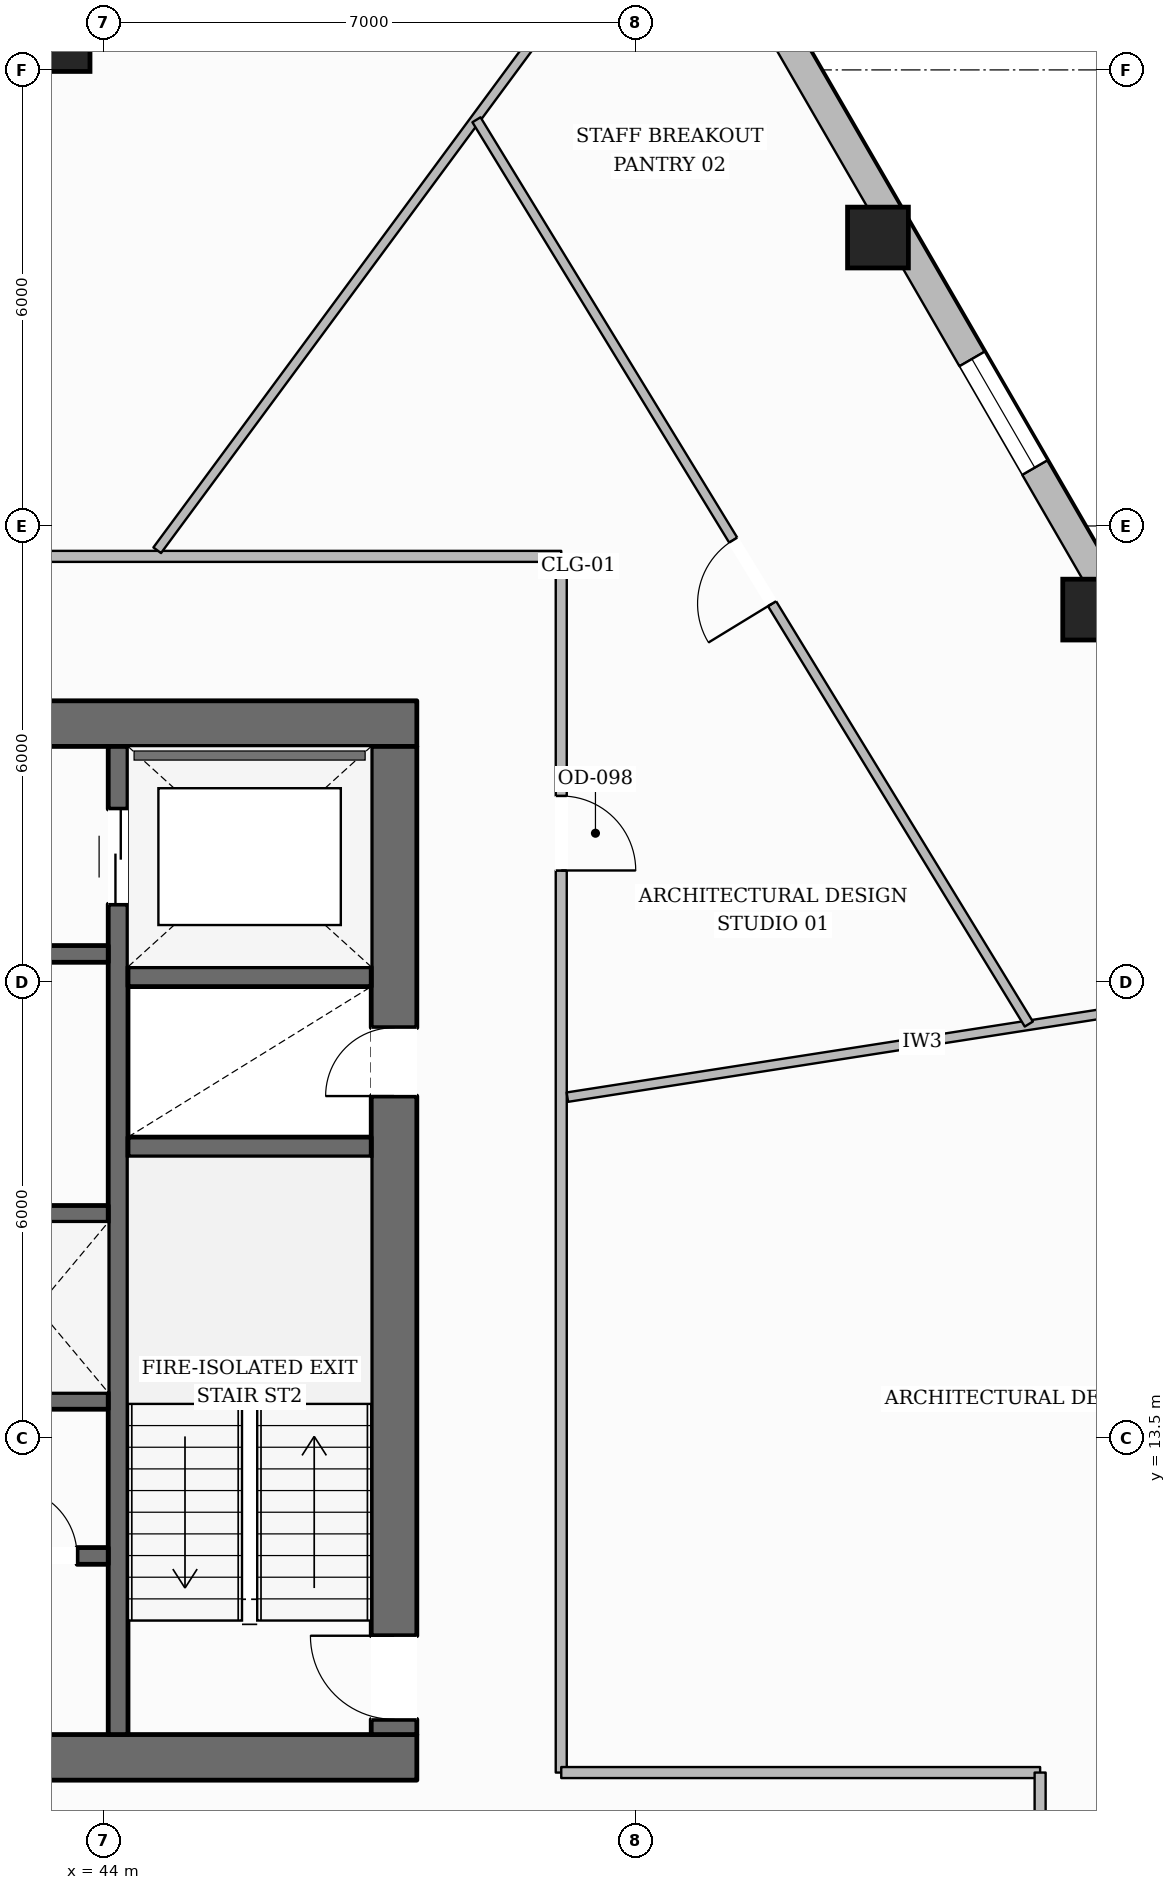
"""IFC4 building model, lengths in metres.
Left out: names, types, materials, properties, quantities, classifications, styles, units other than length and angle.
Written with IfcOpenShell. Run it as: python <this file> out.ifc"""

import sys

from ifc_helpers import new_model, si_unit, direction, frame, frame_2d, origin, origin_2d, place, context, subcontext, project, spatial, rectangle, hollow_rectangle, extrude, element, fill, save


model = new_model("IFC4")
c1 = context("Model", 3, precision=1e-05, world=origin(), true_north=direction((0.0, 1.0)))
c2 = subcontext(c1, "Body", "Model", "MODEL_VIEW")
j1 = project(units=[si_unit("LENGTHUNIT", "METRE"), si_unit("PLANEANGLEUNIT", "RADIAN")], contexts=[c1])
p1 = place(None, origin())
s1 = spatial("IfcSite", under=j1, at=p1, CompositionType="ELEMENT")
p2 = place(p1, origin())
s2 = spatial("IfcBuilding", under=s1, at=p2, CompositionType="ELEMENT")
p3 = place(p2, frame((0.0, 0.0, 40.65)))
s3 = spatial("IfcBuildingStorey", under=s2, at=p3, CompositionType="ELEMENT", Elevation=40.65)
p4 = place(p3, frame((27.88, 9.3, 0.0), z_axis=(0.0, 0.0, 1.0), x_axis=(1.0, 0.0, 0.0)))
e1 = element("IfcWall", 1, at=p4, inside=s3, PredefinedType="SOLIDWALL", context=c2, shape_type="SweptSolid", body=[
    extrude(rectangle(XDim=20.24, YDim=0.6, at=frame_2d((10.12, 0.0))), origin(), (0.0, 0.0, 1.0), 3.59),
])
p5 = place(p4, frame((10.62, 0.0, 0.0)))
e2 = element("IfcOpeningElement", 2, at=p5, cuts=e1, PredefinedType="OPENING", context=c2, shape_type="SweptSolid", body=[
    extrude(rectangle(XDim=1.4, YDim=2.2, at=frame_2d((0.7, 1.1))), frame((0.0, 0.31, 0.0), z_axis=(0.0, -1.0, 0.0), x_axis=(1.0, 0.0, 0.0)), (0.0, 0.0, 1.0), 0.62),
])
p6 = place(p3, frame((27.88, 22.9, 0.0), z_axis=(0.0, 0.0, 1.0), x_axis=(1.0, 0.0, 0.0)))
e3 = element("IfcWall", 3, at=p6, inside=s3, PredefinedType="SOLIDWALL", context=c2, shape_type="SweptSolid", body=[
    extrude(rectangle(XDim=20.24, YDim=0.6, at=frame_2d((10.12, 0.0))), origin(), (0.0, 0.0, 1.0), 3.59),
])
p7 = place(p6, frame((6.395, 0.0, 0.0)))
e4 = element("IfcOpeningElement", 4, at=p7, cuts=e3, PredefinedType="OPENING", context=c2, shape_type="SweptSolid", body=[
    extrude(rectangle(XDim=1.05, YDim=2.15, at=frame_2d((0.525, 1.075))), frame((0.0, 0.31, 0.0), z_axis=(0.0, -1.0, 0.0), x_axis=(1.0, 0.0, 0.0)), (0.0, 0.0, 1.0), 0.62),
])
p8 = place(p6, frame((12.795, 0.0, 0.0)))
e5 = element("IfcOpeningElement", 5, at=p8, cuts=e3, PredefinedType="OPENING", context=c2, shape_type="SweptSolid", body=[
    extrude(rectangle(XDim=1.05, YDim=2.15, at=frame_2d((0.525, 1.075))), frame((0.0, 0.31, 0.0), z_axis=(0.0, -1.0, 0.0), x_axis=(1.0, 0.0, 0.0)), (0.0, 0.0, 1.0), 0.62),
])
p9 = place(p3, frame((47.82, 9.6, 0.0), z_axis=(0.0, 0.0, 1.0), x_axis=(0.0, 1.0, 0.0)))
e6 = element("IfcWall", 6, at=p9, inside=s3, PredefinedType="SOLIDWALL", context=c2, shape_type="SweptSolid", body=[
    extrude(rectangle(XDim=13.0, YDim=0.6, at=frame_2d((6.5, 0.0))), origin(), (0.0, 0.0, 1.0), 3.59),
])
p10 = place(p9, frame((0.2, 0.0, 0.0)))
e7 = element("IfcOpeningElement", 7, at=p10, cuts=e6, PredefinedType="OPENING", context=c2, shape_type="SweptSolid", body=[
    extrude(rectangle(XDim=1.1, YDim=2.15, at=frame_2d((0.55, 1.075))), frame((0.0, 0.31, 0.0), z_axis=(0.0, -1.0, 0.0), x_axis=(1.0, 0.0, 0.0)), (0.0, 0.0, 1.0), 0.62),
])
p11 = place(p9, frame((8.4, 0.0, 0.0)))
e8 = element("IfcOpeningElement", 8, at=p11, cuts=e6, PredefinedType="OPENING", context=c2, shape_type="SweptSolid", body=[
    extrude(rectangle(XDim=0.9, YDim=2.1, at=frame_2d((0.45, 1.05))), frame((0.0, 0.31, 0.0), z_axis=(0.0, -1.0, 0.0), x_axis=(1.0, 0.0, 0.0)), (0.0, 0.0, 1.0), 0.62),
])
p12 = place(p3, frame((44.19, 9.6, 0.0), z_axis=(0.0, 0.0, 1.0), x_axis=(0.0, 1.0, 0.0)))
e9 = element("IfcWall", 9, at=p12, inside=s3, PredefinedType="SHEAR", context=c2, shape_type="SweptSolid", body=[
    extrude(rectangle(XDim=13.0, YDim=0.26, at=frame_2d((6.5, 0.0))), origin(), (0.0, 0.0, 1.0), 3.59),
])
p13 = place(p12, frame((10.925, 0.0, 0.0)))
e10 = element("IfcOpeningElement", 10, at=p13, cuts=e9, PredefinedType="OPENING", context=c2, shape_type="SweptSolid", body=[
    extrude(rectangle(XDim=1.25, YDim=2.25, at=frame_2d((0.625, 1.125))), frame((0.0, 0.14, 0.0), z_axis=(0.0, -1.0, 0.0), x_axis=(1.0, 0.0, 0.0)), (0.0, 0.0, 1.0), 0.28),
])
for number, where, z_axis, x_axis in (
    (11, (44.32, 17.33, 0.0), (0.0, 0.0, 1.0), (1.0, 0.0, 0.0)),
    (12, (44.32, 19.57, 0.0), (0.0, 0.0, 1.0), (1.0, 0.0, 0.0)),
):
    element("IfcWall", number, at=place(p3, frame(where, z_axis=z_axis, x_axis=x_axis)), inside=s3, PredefinedType="SHEAR", context=c2, shape_type="SweptSolid", body=[
        extrude(rectangle(XDim=3.2, YDim=0.26, at=frame_2d((1.6, 0.0))), origin(), (0.0, 0.0, 1.0), 3.59),
    ])
p14 = place(p3, frame((31.94, 19.87, 0.0), z_axis=(0.0, 0.0, 1.0), x_axis=(1.0, 0.0, 0.0)))
e13 = element("IfcWall", 13, at=p14, inside=s3, PredefinedType="SOLIDWALL", context=c2, shape_type="SweptSolid", body=[
    extrude(rectangle(XDim=12.12, YDim=0.22, at=frame_2d((6.06, 0.0))), origin(), (0.0, 0.0, 1.0), 3.59),
])
p15 = place(p14, frame((6.3, 0.0, 0.0)))
e14 = element("IfcOpeningElement", 14, at=p15, cuts=e13, PredefinedType="OPENING", context=c2, shape_type="SweptSolid", body=[
    extrude(rectangle(XDim=1.1, YDim=2.15, at=frame_2d((0.55, 1.075))), frame((0.0, 0.12, 0.0), z_axis=(0.0, -1.0, 0.0), x_axis=(1.0, 0.0, 0.0)), (0.0, 0.0, 1.0), 0.24),
])
p16 = place(p14, frame((9.51, 0.0, 0.0)))
e15 = element("IfcOpeningElement", 15, at=p16, cuts=e13, PredefinedType="OPENING", context=c2, shape_type="SweptSolid", body=[
    extrude(rectangle(XDim=0.9, YDim=2.1, at=frame_2d((0.45, 1.05))), frame((0.0, 0.12, 0.0), z_axis=(0.0, -1.0, 0.0), x_axis=(1.0, 0.0, 0.0)), (0.0, 0.0, 1.0), 0.24),
])
p17 = place(p3, frame((31.94, 16.45, 0.0), z_axis=(0.0, 0.0, 1.0), x_axis=(1.0, 0.0, 0.0)))
e16 = element("IfcWall", 16, at=p17, inside=s3, PredefinedType="SOLIDWALL", context=c2, shape_type="SweptSolid", body=[
    extrude(rectangle(XDim=12.12, YDim=0.22, at=frame_2d((6.06, 0.0))), origin(), (0.0, 0.0, 1.0), 3.59),
])
p18 = place(p3, frame((31.94, 13.99, 0.0), z_axis=(0.0, 0.0, 1.0), x_axis=(1.0, 0.0, 0.0)))
e17 = element("IfcWall", 17, at=p18, inside=s3, PredefinedType="SOLIDWALL", context=c2, shape_type="SweptSolid", body=[
    extrude(rectangle(XDim=12.12, YDim=0.22, at=frame_2d((6.06, 0.0))), origin(), (0.0, 0.0, 1.0), 3.59),
])
p19 = place(p18, frame((0.385, 0.0, 0.0)))
e18 = element("IfcOpeningElement", 18, at=p19, cuts=e17, PredefinedType="OPENING", context=c2, shape_type="SweptSolid", body=[
    extrude(rectangle(XDim=1.1, YDim=2.2, at=frame_2d((0.55, 1.1))), frame((0.0, 0.12, 0.0), z_axis=(0.0, -1.0, 0.0), x_axis=(1.0, 0.0, 0.0)), (0.0, 0.0, 1.0), 0.24),
])
p20 = place(p18, frame((2.435, 0.0, 0.0)))
e19 = element("IfcOpeningElement", 19, at=p20, cuts=e17, PredefinedType="OPENING", context=c2, shape_type="SweptSolid", body=[
    extrude(rectangle(XDim=1.1, YDim=2.2, at=frame_2d((0.55, 1.1))), frame((0.0, 0.12, 0.0), z_axis=(0.0, -1.0, 0.0), x_axis=(1.0, 0.0, 0.0)), (0.0, 0.0, 1.0), 0.24),
])
p21 = place(p18, frame((4.485, 0.0, 0.0)))
e20 = element("IfcOpeningElement", 20, at=p21, cuts=e17, PredefinedType="OPENING", context=c2, shape_type="SweptSolid", body=[
    extrude(rectangle(XDim=1.1, YDim=2.2, at=frame_2d((0.55, 1.1))), frame((0.0, 0.12, 0.0), z_axis=(0.0, -1.0, 0.0), x_axis=(1.0, 0.0, 0.0)), (0.0, 0.0, 1.0), 0.24),
])
p22 = place(p3, frame((40.28, 11.95, 0.0), z_axis=(0.0, 0.0, 1.0), x_axis=(1.0, 0.0, 0.0)))
e21 = element("IfcWall", 21, at=p22, inside=s3, PredefinedType="SOLIDWALL", context=c2, shape_type="SweptSolid", body=[
    extrude(rectangle(XDim=3.78, YDim=0.22, at=frame_2d((1.89, 0.0))), origin(), (0.0, 0.0, 1.0), 3.59),
])
p23 = place(p22, frame((0.62, 0.0, 0.0)))
e22 = element("IfcOpeningElement", 22, at=p23, cuts=e21, PredefinedType="OPENING", context=c2, shape_type="SweptSolid", body=[
    extrude(rectangle(XDim=0.9, YDim=2.1, at=frame_2d((0.45, 1.05))), frame((0.0, 0.12, 0.0), z_axis=(0.0, -1.0, 0.0), x_axis=(1.0, 0.0, 0.0)), (0.0, 0.0, 1.0), 0.24),
])
p24 = place(p22, frame((2.47, 0.0, 0.0)))
e23 = element("IfcOpeningElement", 23, at=p24, cuts=e21, PredefinedType="OPENING", context=c2, shape_type="SweptSolid", body=[
    extrude(rectangle(XDim=0.9, YDim=2.1, at=frame_2d((0.45, 1.05))), frame((0.0, 0.12, 0.0), z_axis=(0.0, -1.0, 0.0), x_axis=(1.0, 0.0, 0.0)), (0.0, 0.0, 1.0), 0.24),
])
for number, where, z_axis, x_axis in (
    (24, (57.018, 24.4, 0.0), (0.0, 0.0, 1.0), (1.0, 0.0, 0.0)),
    (25, (54.187, 29.295, 0.0), (0.0, 0.0, 1.0), (1.0, 0.0, 0.0)),
):
    element("IfcColumn", number, at=place(p3, frame(where, z_axis=z_axis, x_axis=x_axis)), inside=s3, PredefinedType="COLUMN", context=c2, shape_type="SweptSolid", body=[
        extrude(hollow_rectangle(XDim=0.8, YDim=0.8, WallThickness=0.036, at=origin_2d()), origin(), (0.0, 0.0, 1.0), 3.59),
    ])
p25 = place(p3, frame((43.5, 31.8, 0.0), z_axis=(0.0, 0.0, 1.0), x_axis=(1.0, 0.0, 0.0)))
e26 = element("IfcColumn", 26, at=p25, inside=s3, PredefinedType="COLUMN", context=c2, shape_type="SweptSolid", body=[
    extrude(hollow_rectangle(XDim=0.64, YDim=0.64, WallThickness=0.028, at=origin_2d()), origin(), (0.0, 0.0, 1.0), 3.59),
])
p26 = place(p3, frame((63.15, 14.89, 0.0), z_axis=(0.0, 0.0, 1.0), x_axis=(-0.495908066063, -0.868375028437, 0.0)))
e27 = element("IfcWall", 27, at=p26, inside=s3, PredefinedType="STANDARD", context=c2, shape_type="SweptSolid", body=[
    extrude(rectangle(XDim=16.172, YDim=0.3, at=frame_2d((8.086, 0.0))), origin(), (0.0, 0.0, 1.0), 2.97),
])
p27 = place(p26, frame((7.486, 0.0, 0.65)))
e28 = element("IfcOpeningElement", 28, at=p27, cuts=e27, PredefinedType="OPENING", context=c2, shape_type="SweptSolid", body=[
    extrude(rectangle(XDim=1.2, YDim=1.7, at=frame_2d((0.6, 0.85))), frame((0.0, 0.16, 0.0), z_axis=(0.0, -1.0, 0.0), x_axis=(1.0, 0.0, 0.0)), (0.0, 0.0, 1.0), 0.32),
])
p28 = place(p3, frame((45.69, 44.525, 0.0), z_axis=(0.0, 0.0, 1.0), x_axis=(0.500663446356, -0.865642023866, 0.0)))
e29 = element("IfcWall", 29, at=p28, inside=s3, PredefinedType="STANDARD", context=c2, shape_type="SweptSolid", body=[
    extrude(rectangle(XDim=34.878, YDim=0.38, at=frame_2d((17.439, 0.0))), origin(), (0.0, 0.0, 1.0), 2.97),
])
p29 = place(p28, frame((8.319, 0.0, 0.0)))
e30 = element("IfcOpeningElement", 30, at=p29, cuts=e29, PredefinedType="OPENING", context=c2, shape_type="SweptSolid", body=[
    extrude(rectangle(XDim=1.0, YDim=2.2, at=frame_2d((0.5, 1.1))), frame((0.0, 0.2, 0.0), z_axis=(0.0, -1.0, 0.0), x_axis=(1.0, 0.0, 0.0)), (0.0, 0.0, 1.0), 0.4),
])
p30 = place(p28, frame((30.75, 0.0, 0.65)))
e31 = element("IfcOpeningElement", 31, at=p30, cuts=e29, PredefinedType="OPENING", context=c2, shape_type="SweptSolid", body=[
    extrude(rectangle(XDim=1.65, YDim=1.75, at=frame_2d((0.825, 0.875))), frame((0.0, 0.2, 0.0), z_axis=(0.0, -1.0, 0.0), x_axis=(1.0, 0.0, 0.0)), (0.0, 0.0, 1.0), 0.4),
])
p31 = place(p28, frame((25.095, 0.0, 0.65)))
e32 = element("IfcOpeningElement", 32, at=p31, cuts=e29, PredefinedType="OPENING", context=c2, shape_type="SweptSolid", body=[
    extrude(rectangle(XDim=1.65, YDim=1.75, at=frame_2d((0.825, 0.875))), frame((0.0, 0.2, 0.0), z_axis=(0.0, -1.0, 0.0), x_axis=(1.0, 0.0, 0.0)), (0.0, 0.0, 1.0), 0.4),
])
p32 = place(p28, frame((19.441, 0.0, 0.65)))
e33 = element("IfcOpeningElement", 33, at=p32, cuts=e29, PredefinedType="OPENING", context=c2, shape_type="SweptSolid", body=[
    extrude(rectangle(XDim=1.65, YDim=1.75, at=frame_2d((0.825, 0.875))), frame((0.0, 0.2, 0.0), z_axis=(0.0, -1.0, 0.0), x_axis=(1.0, 0.0, 0.0)), (0.0, 0.0, 1.0), 0.4),
])
p33 = place(p28, frame((2.477, 0.0, 0.65)))
e34 = element("IfcOpeningElement", 34, at=p33, cuts=e29, PredefinedType="OPENING", context=c2, shape_type="SweptSolid", body=[
    extrude(rectangle(XDim=1.65, YDim=1.75, at=frame_2d((0.825, 0.875))), frame((0.0, 0.2, 0.0), z_axis=(0.0, -1.0, 0.0), x_axis=(1.0, 0.0, 0.0)), (0.0, 0.0, 1.0), 0.4),
])
p34 = place(p3, frame((39.0, 25.1, 0.0), z_axis=(0.0, 0.0, 1.0), x_axis=(1.0, 0.0, 0.0)))
e35 = element("IfcWall", 35, at=p34, inside=s3, PredefinedType="PARTITIONING", context=c2, shape_type="SweptSolid", body=[
    extrude(rectangle(XDim=11.02, YDim=0.145, at=frame_2d((5.51, 0.0))), origin(), (0.0, 0.0, 1.0), 3.59),
])
p35 = place(p3, frame((50.02, 25.1, 0.0), z_axis=(0.0, 0.0, 1.0), x_axis=(0.0, -1.0, 0.0)))
e36 = element("IfcWall", 36, at=p35, inside=s3, PredefinedType="PARTITIONING", context=c2, shape_type="SweptSolid", body=[
    extrude(rectangle(XDim=16.0, YDim=0.145, at=frame_2d((8.0, 0.0))), origin(), (0.0, 0.0, 1.0), 3.278),
])
p36 = place(p35, frame((3.152, 0.0, 0.0)))
e37 = element("IfcOpeningElement", 37, at=p36, cuts=e36, PredefinedType="OPENING", context=c2, shape_type="SweptSolid", body=[
    extrude(rectangle(XDim=0.98, YDim=2.15, at=frame_2d((0.49, 1.075))), frame((0.0, 0.083, 0.0), z_axis=(0.0, -1.0, 0.0), x_axis=(1.0, 0.0, 0.0)), (0.0, 0.0, 1.0), 0.165),
])
p37 = place(p3, frame((50.02, 9.1, 0.0), z_axis=(0.0, 0.0, 1.0), x_axis=(1.0, 0.0, 0.0)))
e38 = element("IfcWall", 38, at=p37, inside=s3, PredefinedType="PARTITIONING", context=c2, shape_type="SweptSolid", body=[
    extrude(rectangle(XDim=6.3, YDim=0.145, at=frame_2d((3.15, 0.0))), origin(), (0.0, 0.0, 1.0), 3.59),
])
p38 = place(p3, frame((56.32, 9.1, 0.0), z_axis=(0.0, 0.0, 1.0), x_axis=(0.0, -1.0, 0.0)))
e39 = element("IfcWall", 39, at=p38, inside=s3, PredefinedType="PARTITIONING", context=c2, shape_type="SweptSolid", body=[
    extrude(rectangle(XDim=2.0, YDim=0.145, at=frame_2d((1.0, 0.0))), origin(), (0.0, 0.0, 1.0), 3.59),
])
p39 = place(p3, frame((50.101, 17.986, 0.0), z_axis=(0.0, 0.0, 1.0), x_axis=(0.988074242468, 0.153978217199, 0.0)))
e40 = element("IfcWall", 40, at=p39, inside=s3, PredefinedType="PARTITIONING", context=c2, shape_type="SweptSolid", body=[
    extrude(rectangle(XDim=9.453, YDim=0.125, at=frame_2d((4.727, 0.0))), origin(), (0.0, 0.0, 1.0), 3.057),
])
p40 = place(p3, frame((44.704, 25.18, 0.0), z_axis=(0.0, 0.0, 1.0), x_axis=(0.593980052091, 0.804479768371, 0.0)))
e41 = element("IfcWall", 41, at=p40, inside=s3, PredefinedType="PARTITIONING", context=c2, shape_type="SweptSolid", body=[
    extrude(rectangle(XDim=10.691, YDim=0.125, at=frame_2d((5.346, 0.0))), origin(), (0.0, 0.0, 1.0), 3.057),
])
p41 = place(p3, frame((56.171, 18.947, 0.0), z_axis=(0.0, 0.0, 1.0), x_axis=(-0.521265818692, 0.853394367373, 0.0)))
e42 = element("IfcWall", 42, at=p41, inside=s3, PredefinedType="PARTITIONING", context=c2, shape_type="SweptSolid", body=[
    extrude(rectangle(XDim=13.941, YDim=0.125, at=frame_2d((6.97, 0.0))), origin(), (0.0, 0.0, 1.0), 3.59),
])
p42 = place(p41, frame((6.481, 0.0, 0.0)))
e43 = element("IfcOpeningElement", 43, at=p42, cuts=e42, PredefinedType="OPENING", context=c2, shape_type="SweptSolid", body=[
    extrude(rectangle(XDim=0.98, YDim=2.15, at=frame_2d((0.49, 1.075))), frame((0.0, 0.073, 0.0), z_axis=(0.0, -1.0, 0.0), x_axis=(1.0, 0.0, 0.0)), (0.0, 0.0, 1.0), 0.145),
])
p43 = place(p32, origin())
e44 = element("IfcWindow", 44, at=p43, inside=s3, PartitioningType="SINGLE_PANEL", PredefinedType="WINDOW", context=c2, shape_type="SweptSolid", body=[
    extrude(rectangle(XDim=1.65, YDim=1.75, at=frame_2d((0.825, 0.875))), frame((0.0, 0.03, 0.0), z_axis=(0.0, -1.0, 0.0), x_axis=(1.0, 0.0, 0.0)), (0.0, 0.0, 1.0), 0.06),
])
fill(e33, e44)
p44 = place(p10, origin())
e45 = element("IfcDoor", 45, at=p44, inside=s3, OperationType="SINGLE_SWING_RIGHT", PredefinedType="DOOR", context=c2, shape_type="SweptSolid", body=[
    extrude(rectangle(XDim=1.1, YDim=2.15, at=frame_2d((0.55, 1.075))), frame((0.0, 0.025, 0.0), z_axis=(0.0, -1.0, 0.0), x_axis=(1.0, 0.0, 0.0)), (0.0, 0.0, 1.0), 0.05),
])
fill(e7, e45)
p45 = place(p11, origin())
e46 = element("IfcDoor", 46, at=p45, inside=s3, OperationType="SINGLE_SWING_LEFT", PredefinedType="DOOR", context=c2, shape_type="SweptSolid", body=[
    extrude(rectangle(XDim=0.9, YDim=2.1, at=frame_2d((0.45, 1.05))), frame((0.0, 0.025, 0.0), z_axis=(0.0, -1.0, 0.0), x_axis=(1.0, 0.0, 0.0)), (0.0, 0.0, 1.0), 0.05),
])
fill(e8, e46)
p46 = place(p13, origin())
e47 = element("IfcDoor", 47, at=p46, inside=s3, OperationType="DOUBLE_DOOR_SLIDING", PredefinedType="DOOR", context=c2, shape_type="SweptSolid", body=[
    extrude(rectangle(XDim=1.25, YDim=2.25, at=frame_2d((0.625, 1.125))), frame((0.0, 0.025, 0.0), z_axis=(0.0, -1.0, 0.0), x_axis=(1.0, 0.0, 0.0)), (0.0, 0.0, 1.0), 0.05),
])
fill(e10, e47)
p47 = place(p24, origin())
e48 = element("IfcDoor", 48, at=p47, inside=s3, OperationType="SINGLE_SWING_LEFT", PredefinedType="DOOR", context=c2, shape_type="SweptSolid", body=[
    extrude(rectangle(XDim=0.9, YDim=2.1, at=frame_2d((0.45, 1.05))), frame((0.0, 0.025, 0.0), z_axis=(0.0, -1.0, 0.0), x_axis=(1.0, 0.0, 0.0)), (0.0, 0.0, 1.0), 0.05),
])
fill(e23, e48)
p48 = place(p36, origin())
e49 = element("IfcDoor", 49, at=p48, inside=s3, OperationType="SINGLE_SWING_RIGHT", PredefinedType="DOOR", context=c2, shape_type="SweptSolid", body=[
    extrude(rectangle(XDim=0.98, YDim=2.15, at=frame_2d((0.49, 1.075))), frame((0.0, 0.025, 0.0), z_axis=(0.0, -1.0, 0.0), x_axis=(1.0, 0.0, 0.0)), (0.0, 0.0, 1.0), 0.05),
])
fill(e37, e49)
p49 = place(p42, origin())
e50 = element("IfcDoor", 50, at=p49, inside=s3, OperationType="SINGLE_SWING_LEFT", PredefinedType="DOOR", context=c2, shape_type="SweptSolid", body=[
    extrude(rectangle(XDim=0.98, YDim=2.15, at=frame_2d((0.49, 1.075))), frame((0.0, 0.025, 0.0), z_axis=(0.0, -1.0, 0.0), x_axis=(1.0, 0.0, 0.0)), (0.0, 0.0, 1.0), 0.05),
])
fill(e43, e50)
save(model, sys.argv[1])
